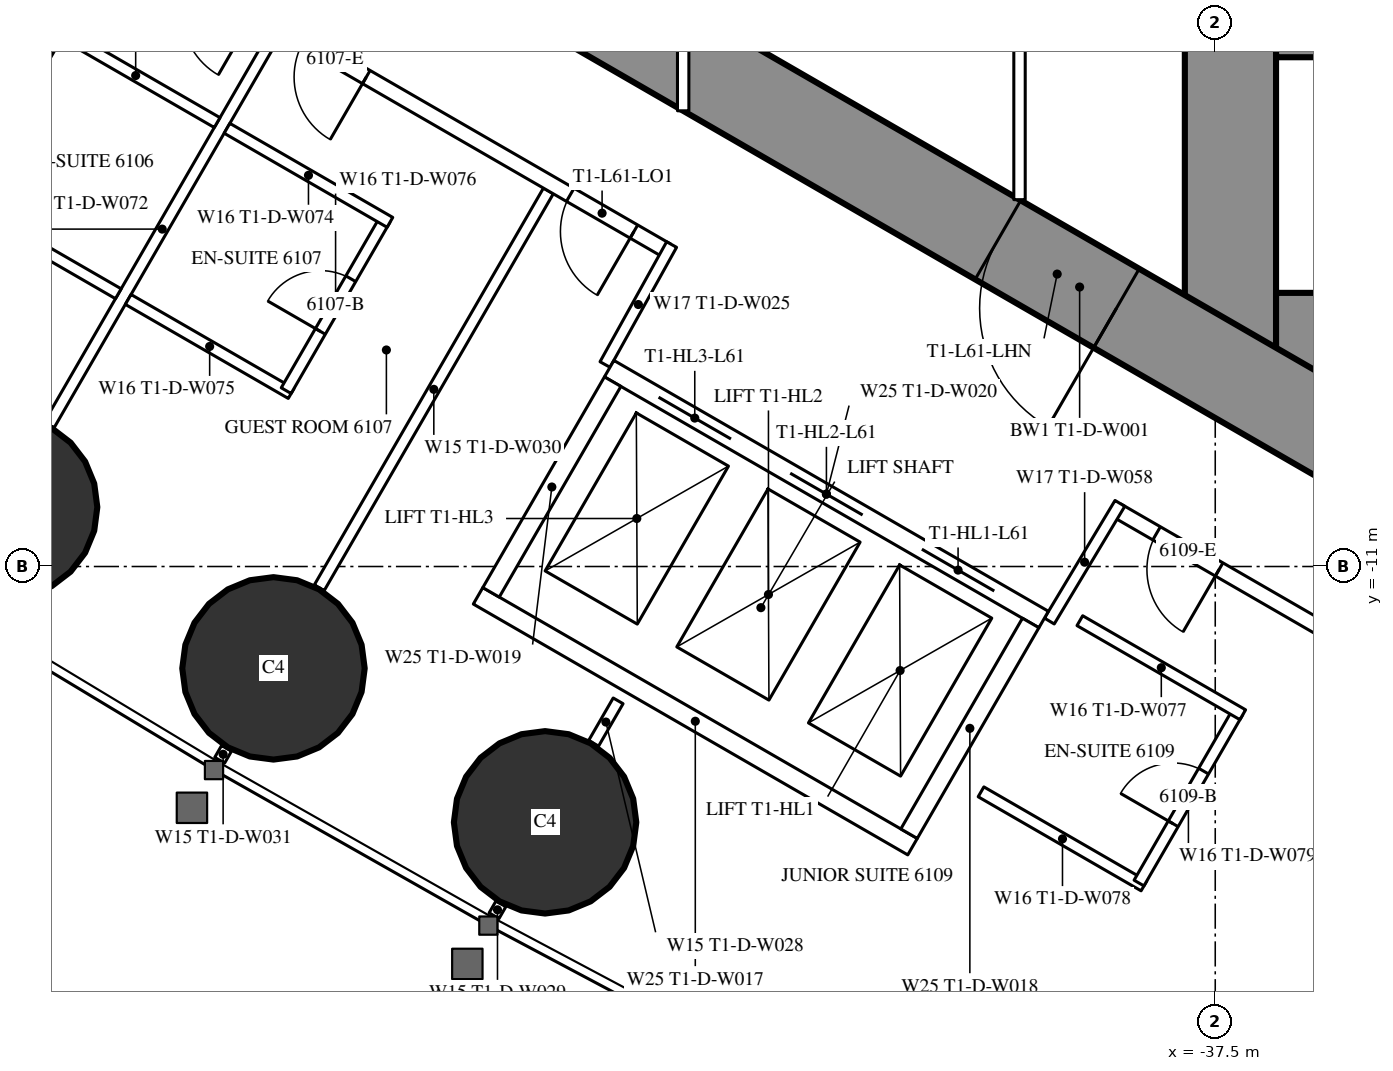
"""IFC4 building model, lengths in metres.
Left out: names, types, materials, properties, quantities, classifications, styles, units other than length and angle.
Written with IfcOpenShell. Run it as: python <this file> out.ifc"""

import sys

from ifc_helpers import new_model, si_unit, direction, frame, frame_2d, origin, origin_2d, place, context, subcontext, project, spatial, rectangle, circle, extrude, element, fill, save


model = new_model("IFC4")
c1 = context("Model", 3, precision=1e-05, world=origin(), true_north=direction((0.0, 1.0)))
c2 = subcontext(c1, "Body", "Model", "MODEL_VIEW")
j1 = project(units=[si_unit("LENGTHUNIT", "METRE"), si_unit("PLANEANGLEUNIT", "RADIAN")], contexts=[c1])
p1 = place(None, origin())
s1 = spatial("IfcSite", under=j1, at=p1, CompositionType="ELEMENT")
p2 = place(p1, origin())
s2 = spatial("IfcBuilding", under=s1, at=p2, CompositionType="ELEMENT")
p3 = place(p2, frame((0.0, 0.0, 229.7)))
s3 = spatial("IfcBuildingStorey", under=s2, at=p3, CompositionType="ELEMENT", Elevation=229.7)
for number, where, z_axis, x_axis in (
    (1, (-53.408, -10.219, 0.0), (0.0, 0.0, 1.0), (1.0, 0.0, 0.0)),
    (2, (-49.89, -12.34, 0.0), (0.0, 0.0, 1.0), (1.0, 0.0, 0.0)),
    (3, (-46.317, -14.365, 0.0), (0.0, 0.0, 1.0), (1.0, 0.0, 0.0)),
):
    element("IfcColumn", number, at=place(p3, frame(where, z_axis=z_axis, x_axis=x_axis)), inside=s3, PredefinedType="COLUMN", context=c2, shape_type="SweptSolid", body=[
        extrude(circle(Radius=1.2, at=origin_2d()), origin(), (0.0, 0.0, 1.0), 3.6),
    ])
p4 = place(p3, frame((-37.3, 8.6, 0.0), z_axis=(0.0, 0.0, 1.0), x_axis=(0.0, -1.0, 0.0)))
e4 = element("IfcWall", 4, at=p4, inside=s3, PredefinedType="SHEAR", context=c2, shape_type="SweptSolid", body=[
    extrude(rectangle(XDim=17.2, YDim=1.2, at=frame_2d((8.6, 0.0))), origin(), (0.0, 0.0, 1.0), 3.6),
])
p5 = place(p4, frame((7.7, 0.0, 0.0)))
e5 = element("IfcOpeningElement", 5, at=p5, cuts=e4, PredefinedType="OPENING", context=c2, shape_type="SweptSolid", body=[
    extrude(rectangle(XDim=1.8, YDim=2.2, at=frame_2d((0.9, 1.1))), frame((0.0, 0.61, 0.0), z_axis=(0.0, -1.0, 0.0), x_axis=(1.0, 0.0, 0.0)), (0.0, 0.0, 1.0), 1.22),
])
p6 = place(p3, frame((-28.3, -8.0, 0.0), z_axis=(0.0, 0.0, 1.0), x_axis=(-1.0, 0.0, 0.0)))
e6 = element("IfcWall", 6, at=p6, inside=s3, PredefinedType="SHEAR", context=c2, shape_type="SweptSolid", body=[
    extrude(rectangle(XDim=8.4, YDim=1.2, at=frame_2d((4.2, 0.0))), origin(), (0.0, 0.0, 1.0), 3.6),
])
p7 = place(p6, frame((0.25, 0.0, 0.0)))
e7 = element("IfcOpeningElement", 7, at=p7, cuts=e6, PredefinedType="OPENING", context=c2, shape_type="SweptSolid", body=[
    extrude(rectangle(XDim=1.0, YDim=2.2, at=frame_2d((0.5, 1.1))), frame((0.0, 0.61, 0.0), z_axis=(0.0, -1.0, 0.0), x_axis=(1.0, 0.0, 0.0)), (0.0, 0.0, 1.0), 1.22),
])
p8 = place(p3, frame((-28.3, -4.15, 0.0), z_axis=(0.0, 0.0, 1.0), x_axis=(-1.0, 0.0, 0.0)))
e8 = element("IfcWall", 8, at=p8, inside=s3, PredefinedType="SHEAR", context=c2, shape_type="SweptSolid", body=[
    extrude(rectangle(XDim=8.4, YDim=0.3, at=frame_2d((4.2, 0.0))), origin(), (0.0, 0.0, 1.0), 3.6),
])
p9 = place(p3, frame((-27.2, -14.3, 0.0), z_axis=(0.0, 0.0, 1.0), x_axis=(-0.866024021859, 0.500002393557, 0.0)))
e9 = element("IfcWall", 9, at=p9, inside=s3, PredefinedType="SHEAR", context=c2, shape_type="SweptSolid", body=[
    extrude(rectangle(XDim=27.907, YDim=1.2, at=frame_2d((13.954, 0.0))), origin(), (0.0, 0.0, 1.0), 3.6),
])
p10 = place(p9, frame((4.6, 0.0, 0.0)))
e10 = element("IfcOpeningElement", 10, at=p10, cuts=e9, PredefinedType="OPENING", context=c2, shape_type="SweptSolid", body=[
    extrude(rectangle(XDim=1.0, YDim=2.2, at=frame_2d((0.5, 1.1))), frame((0.0, 0.61, 0.0), z_axis=(0.0, -1.0, 0.0), x_axis=(1.0, 0.0, 0.0)), (0.0, 0.0, 1.0), 1.22),
])
p11 = place(p9, frame((13.395, 0.0, 0.0)))
e11 = element("IfcOpeningElement", 11, at=p11, cuts=e9, PredefinedType="OPENING", context=c2, shape_type="SweptSolid", body=[
    extrude(rectangle(XDim=1.8, YDim=2.2, at=frame_2d((0.9, 1.1))), frame((0.0, 0.61, 0.0), z_axis=(0.0, -1.0, 0.0), x_axis=(1.0, 0.0, 0.0)), (0.0, 0.0, 1.0), 1.22),
])
p12 = place(p3, frame((-46.898, -15.439, 0.0), z_axis=(0.0, 0.0, 1.0), x_axis=(-0.500232303069, -0.865891241997, 0.0)))
e12 = element("IfcWall", 12, at=p12, inside=s3, PredefinedType="PARTITIONING", context=c2, shape_type="SweptSolid", body=[
    extrude(rectangle(XDim=0.18, YDim=0.15, at=frame_2d((0.09, 0.0))), origin(), (0.0, 0.0, 1.0), 2.45),
])
p13 = place(p3, frame((-46.274, -6.059, 0.0), z_axis=(0.0, 0.0, 1.0), x_axis=(-0.500020471368, -0.866013584312, 0.0)))
e13 = element("IfcWall", 13, at=p13, inside=s3, PredefinedType="PARTITIONING", context=c2, shape_type="SweptSolid", body=[
    extrude(rectangle(XDim=6.028, YDim=0.15, at=frame_2d((3.014, 0.0))), origin(), (0.0, 0.0, 1.0), 2.45),
])
p14 = place(p3, frame((-50.508, -13.392, 0.0), z_axis=(0.0, 0.0, 1.0), x_axis=(-0.499644091975, -0.866230789891, 0.0)))
e14 = element("IfcWall", 14, at=p14, inside=s3, PredefinedType="PARTITIONING", context=c2, shape_type="SweptSolid", body=[
    extrude(rectangle(XDim=0.18, YDim=0.15, at=frame_2d((0.09, 0.0))), origin(), (0.0, 0.0, 1.0), 2.45),
])
p15 = place(p3, frame((-49.866, -3.985, 0.0), z_axis=(0.0, 0.0, 1.0), x_axis=(-0.500000694566, -0.866025002776, 0.0)))
e15 = element("IfcWall", 15, at=p15, inside=s3, PredefinedType="PARTITIONING", context=c2, shape_type="SweptSolid", body=[
    extrude(rectangle(XDim=5.95, YDim=0.15, at=frame_2d((2.975, 0.0))), origin(), (0.0, 0.0, 1.0), 2.45),
])
p16 = place(p3, frame((-45.356, -12.767, 0.0), z_axis=(0.0, 0.0, 1.0), x_axis=(-0.499886366516, -0.866091000168, 0.0)))
e16 = element("IfcWall", 16, at=p16, inside=s3, PredefinedType="PARTITIONING", context=c2, shape_type="SweptSolid", body=[
    extrude(rectangle(XDim=0.645, YDim=0.15, at=frame_2d((0.322, 0.0))), origin(), (0.0, 0.0, 1.0), 3.35),
])
p17 = place(p3, frame((-28.737, -16.068, 0.0), z_axis=(0.0, 0.0, 1.0), x_axis=(-0.866029399323, 0.49999307946, 0.0)))
e17 = element("IfcWall", 17, at=p17, inside=s3, PredefinedType="PARTITIONING", context=c2, shape_type="SweptSolid", body=[
    extrude(rectangle(XDim=11.61, YDim=0.2, at=frame_2d((5.805, 0.0))), origin(), (0.0, 0.0, 1.0), 3.35),
])
p18 = place(p17, frame((1.08, 0.0, 0.0)))
e18 = element("IfcOpeningElement", 18, at=p18, cuts=e17, PredefinedType="OPENING", context=c2, shape_type="SweptSolid", body=[
    extrude(rectangle(XDim=1.8, YDim=2.04, at=frame_2d((0.9, 1.02))), frame((0.0, 0.11, 0.0), z_axis=(0.0, -1.0, 0.0), x_axis=(1.0, 0.0, 0.0)), (0.0, 0.0, 1.0), 0.22),
])
p19 = place(p17, frame((10.06, 0.0, 0.0)))
e19 = element("IfcOpeningElement", 19, at=p19, cuts=e17, PredefinedType="OPENING", context=c2, shape_type="SweptSolid", body=[
    extrude(rectangle(XDim=0.95, YDim=2.2, at=frame_2d((0.475, 1.1))), frame((0.0, 0.11, 0.0), z_axis=(0.0, -1.0, 0.0), x_axis=(1.0, 0.0, 0.0)), (0.0, 0.0, 1.0), 0.22),
])
p20 = place(p3, frame((-44.715, -6.844, 0.0), z_axis=(0.0, 0.0, 1.0), x_axis=(-0.866025261224, 0.500000246922, 0.0)))
e20 = element("IfcWall", 20, at=p20, inside=s3, PredefinedType="PARTITIONING", context=c2, shape_type="SweptSolid", body=[
    extrude(rectangle(XDim=13.567, YDim=0.2, at=frame_2d((6.783, 0.0))), origin(), (0.0, 0.0, 1.0), 3.35),
])
p21 = place(p20, frame((6.266, 0.0, 0.0)))
e21 = element("IfcOpeningElement", 21, at=p21, cuts=e20, PredefinedType="OPENING", context=c2, shape_type="SweptSolid", body=[
    extrude(rectangle(XDim=0.95, YDim=2.2, at=frame_2d((0.475, 1.1))), frame((0.0, 0.11, 0.0), z_axis=(0.0, -1.0, 0.0), x_axis=(1.0, 0.0, 0.0)), (0.0, 0.0, 1.0), 0.22),
])
p22 = place(p20, frame((4.565, 0.0, 0.0)))
e22 = element("IfcOpeningElement", 22, at=p22, cuts=e20, PredefinedType="OPENING", context=c2, shape_type="SweptSolid", body=[
    extrude(rectangle(XDim=0.95, YDim=2.2, at=frame_2d((0.475, 1.1))), frame((0.0, 0.11, 0.0), z_axis=(0.0, -1.0, 0.0), x_axis=(1.0, 0.0, 0.0)), (0.0, 0.0, 1.0), 0.22),
])
p23 = place(p20, frame((0.5, 0.0, 0.0)))
e23 = element("IfcOpeningElement", 23, at=p23, cuts=e20, PredefinedType="OPENING", context=c2, shape_type="SweptSolid", body=[
    extrude(rectangle(XDim=0.967, YDim=2.2, at=frame_2d((0.483, 1.1))), frame((0.0, 0.11, 0.0), z_axis=(0.0, -1.0, 0.0), x_axis=(1.0, 0.0, 0.0)), (0.0, 0.0, 1.0), 0.22),
])
for number, where, z_axis, x_axis in (
    (24, (-39.683, -11.718, 0.0), (0.0, 0.0, 1.0), (0.514, 0.858, 0.0)),
    (25, (-44.652, -6.764, 0.0), (0.0, 0.0, 1.0), (-0.485, -0.874, 0.0)),
):
    element("IfcWall", number, at=place(p3, frame(where, z_axis=z_axis, x_axis=x_axis)), inside=s3, PredefinedType="PARTITIONING", context=c2, shape_type="SweptSolid", body=[
        extrude(rectangle(XDim=1.805, YDim=0.15, at=frame_2d((0.903, 0.0))), origin(), (0.0, 0.0, 1.0), 3.35),
    ])
p24 = place(p3, frame((-51.931, -7.411, 0.0), z_axis=(0.0, 0.0, 1.0), x_axis=(-0.866006523861, 0.500032699561, 0.0)))
e26 = element("IfcWall", 26, at=p24, inside=s3, PredefinedType="PARTITIONING", context=c2, shape_type="SweptSolid", body=[
    extrude(rectangle(XDim=2.475, YDim=0.15, at=frame_2d((1.237, 0.0))), origin(), (0.0, 0.0, 1.0), 3.35),
])
p25 = place(p3, frame((-52.71, -3.96, 0.0), z_axis=(0.0, 0.0, 1.0), x_axis=(-0.500006934395, -0.866021400173, 0.0)))
e27 = element("IfcWall", 27, at=p25, inside=s3, PredefinedType="PARTITIONING", context=c2, shape_type="SweptSolid", body=[
    extrude(rectangle(XDim=2.6, YDim=0.15, at=frame_2d((1.3, 0.0))), origin(), (0.0, 0.0, 1.0), 3.35),
])
p26 = place(p25, frame((0.9, 0.0, 0.0)))
e28 = element("IfcOpeningElement", 28, at=p26, cuts=e27, PredefinedType="OPENING", context=c2, shape_type="SweptSolid", body=[
    extrude(rectangle(XDim=0.8, YDim=2.2, at=frame_2d((0.4, 1.1))), frame((0.0, 0.085, 0.0), z_axis=(0.0, -1.0, 0.0), x_axis=(1.0, 0.0, 0.0)), (0.0, 0.0, 1.0), 0.17),
])
p27 = place(p3, frame((-50.631, -5.16, 0.0), z_axis=(0.0, 0.0, 1.0), x_axis=(-0.86604923931, 0.499958713387, 0.0)))
e29 = element("IfcWall", 29, at=p27, inside=s3, PredefinedType="PARTITIONING", context=c2, shape_type="SweptSolid", body=[
    extrude(rectangle(XDim=2.475, YDim=0.15, at=frame_2d((1.237, 0.0))), origin(), (0.0, 0.0, 1.0), 2.5),
])
p28 = place(p3, frame((-49.658, -8.724, 0.0), z_axis=(0.0, 0.0, 1.0), x_axis=(-0.866031185235, 0.4999899861, 0.0)))
e30 = element("IfcWall", 30, at=p28, inside=s3, PredefinedType="PARTITIONING", context=c2, shape_type="SweptSolid", body=[
    extrude(rectangle(XDim=2.475, YDim=0.15, at=frame_2d((1.238, 0.0))), origin(), (0.0, 0.0, 1.0), 3.35),
])
p29 = place(p3, frame((-48.423, -6.435, 0.0), z_axis=(0.0, 0.0, 1.0), x_axis=(-0.500006934395, -0.866021400173, 0.0)))
e31 = element("IfcWall", 31, at=p29, inside=s3, PredefinedType="PARTITIONING", context=c2, shape_type="SweptSolid", body=[
    extrude(rectangle(XDim=2.6, YDim=0.15, at=frame_2d((1.3, 0.0))), origin(), (0.0, 0.0, 1.0), 3.35),
])
p30 = place(p29, frame((0.9, 0.0, 0.0)))
e32 = element("IfcOpeningElement", 32, at=p30, cuts=e31, PredefinedType="OPENING", context=c2, shape_type="SweptSolid", body=[
    extrude(rectangle(XDim=0.8, YDim=2.2, at=frame_2d((0.4, 1.1))), frame((0.0, 0.085, 0.0), z_axis=(0.0, -1.0, 0.0), x_axis=(1.0, 0.0, 0.0)), (0.0, 0.0, 1.0), 0.17),
])
p31 = place(p3, frame((-48.358, -6.472, 0.0), z_axis=(0.0, 0.0, 1.0), x_axis=(-0.866073894602, 0.499916002032, 0.0)))
e33 = element("IfcWall", 33, at=p31, inside=s3, PredefinedType="PARTITIONING", context=c2, shape_type="SweptSolid", body=[
    extrude(rectangle(XDim=2.475, YDim=0.15, at=frame_2d((1.238, 0.0))), origin(), (0.0, 0.0, 1.0), 2.5),
])
p32 = place(p3, frame((-38.438, -15.202, 0.0), z_axis=(0.0, 0.0, 1.0), x_axis=(-0.866073894602, 0.499916002032, 0.0)))
e34 = element("IfcWall", 34, at=p32, inside=s3, PredefinedType="PARTITIONING", context=c2, shape_type="SweptSolid", body=[
    extrude(rectangle(XDim=2.475, YDim=0.15, at=frame_2d((1.238, 0.0))), origin(), (0.0, 0.0, 1.0), 3.35),
])
p33 = place(p3, frame((-37.203, -12.913, 0.0), z_axis=(0.0, 0.0, 1.0), x_axis=(-0.500006934395, -0.866021400173, 0.0)))
e35 = element("IfcWall", 35, at=p33, inside=s3, PredefinedType="PARTITIONING", context=c2, shape_type="SweptSolid", body=[
    extrude(rectangle(XDim=2.6, YDim=0.15, at=frame_2d((1.3, 0.0))), origin(), (0.0, 0.0, 1.0), 3.35),
])
p34 = place(p33, frame((0.9, 0.0, 0.0)))
e36 = element("IfcOpeningElement", 36, at=p34, cuts=e35, PredefinedType="OPENING", context=c2, shape_type="SweptSolid", body=[
    extrude(rectangle(XDim=0.8, YDim=2.2, at=frame_2d((0.4, 1.1))), frame((0.0, 0.085, 0.0), z_axis=(0.0, -1.0, 0.0), x_axis=(1.0, 0.0, 0.0)), (0.0, 0.0, 1.0), 0.17),
])
p35 = place(p3, frame((-37.138, -12.95, 0.0), z_axis=(0.0, 0.0, 1.0), x_axis=(-0.866031185235, 0.4999899861, 0.0)))
e37 = element("IfcWall", 37, at=p35, inside=s3, PredefinedType="PARTITIONING", context=c2, shape_type="SweptSolid", body=[
    extrude(rectangle(XDim=2.475, YDim=0.15, at=frame_2d((1.238, 0.0))), origin(), (0.0, 0.0, 1.0), 2.5),
])
p36 = place(p3, frame((-40.075, 6.174, 0.0), z_axis=(0.0, 0.0, 1.0), x_axis=(0.0, -1.0, 0.0)))
e38 = element("IfcWall", 38, at=p36, inside=s3, PredefinedType="PARTITIONING", context=c2, shape_type="SweptSolid", body=[
    extrude(rectangle(XDim=12.348, YDim=0.15, at=frame_2d((6.174, 0.0))), origin(), (0.0, 0.0, 1.0), 3.35),
])
p37 = place(p36, frame((5.274, 0.0, 0.0)))
e39 = element("IfcOpeningElement", 39, at=p37, cuts=e38, PredefinedType="OPENING", context=c2, shape_type="SweptSolid", body=[
    extrude(rectangle(XDim=1.8, YDim=2.2, at=frame_2d((0.9, 1.1))), frame((0.0, 0.085, 0.0), z_axis=(0.0, -1.0, 0.0), x_axis=(1.0, 0.0, 0.0)), (0.0, 0.0, 1.0), 0.17),
])
p38 = place(p3, frame((-44.5, 5.005, 0.0), z_axis=(0.0, 0.0, 1.0), x_axis=(0.0, -1.0, 0.0)))
e40 = element("IfcWall", 40, at=p38, inside=s3, PredefinedType="PARTITIONING", context=c2, shape_type="SweptSolid", body=[
    extrude(rectangle(XDim=10.009, YDim=0.15, at=frame_2d((5.005, 0.0))), origin(), (0.0, 0.0, 1.0), 2.5),
])
p39 = place(p38, frame((4.505, 0.0, 0.0)))
e41 = element("IfcOpeningElement", 41, at=p39, cuts=e40, PredefinedType="OPENING", context=c2, shape_type="SweptSolid", body=[
    extrude(rectangle(XDim=1.0, YDim=2.2, at=frame_2d((0.5, 1.1))), frame((0.0, 0.085, 0.0), z_axis=(0.0, -1.0, 0.0), x_axis=(1.0, 0.0, 0.0)), (0.0, 0.0, 1.0), 0.17),
])
p40 = place(p3, frame((-39.758, -11.697, 0.0), z_axis=(0.0, 0.0, 1.0), x_axis=(-0.866024194504, 0.500002094529, 0.0)))
e42 = element("IfcWall", 42, at=p40, inside=s3, PredefinedType="PARTITIONING", context=c2, shape_type="SweptSolid", body=[
    extrude(rectangle(XDim=6.6, YDim=0.25, at=frame_2d((3.3, 0.0))), origin(), (0.0, 0.0, 1.0), 3.35),
])
p41 = place(p40, frame((0.75, 0.0, 0.0)))
e43 = element("IfcOpeningElement", 43, at=p41, cuts=e42, PredefinedType="OPENING", context=c2, shape_type="SweptSolid", body=[
    extrude(rectangle(XDim=1.1, YDim=2.2, at=frame_2d((0.55, 1.1))), frame((0.0, 0.135, 0.0), z_axis=(0.0, -1.0, 0.0), x_axis=(1.0, 0.0, 0.0)), (0.0, 0.0, 1.0), 0.27),
])
p42 = place(p40, frame((2.75, 0.0, 0.0)))
e44 = element("IfcOpeningElement", 44, at=p42, cuts=e42, PredefinedType="OPENING", context=c2, shape_type="SweptSolid", body=[
    extrude(rectangle(XDim=1.1, YDim=2.2, at=frame_2d((0.55, 1.1))), frame((0.0, 0.135, 0.0), z_axis=(0.0, -1.0, 0.0), x_axis=(1.0, 0.0, 0.0)), (0.0, 0.0, 1.0), 0.27),
])
p43 = place(p40, frame((4.75, 0.0, 0.0)))
e45 = element("IfcOpeningElement", 45, at=p43, cuts=e42, PredefinedType="OPENING", context=c2, shape_type="SweptSolid", body=[
    extrude(rectangle(XDim=1.1, YDim=2.2, at=frame_2d((0.55, 1.1))), frame((0.0, 0.135, 0.0), z_axis=(0.0, -1.0, 0.0), x_axis=(1.0, 0.0, 0.0)), (0.0, 0.0, 1.0), 0.27),
])
p44 = place(p3, frame((-41.482, -14.686, 0.0), z_axis=(0.0, 0.0, 1.0), x_axis=(-0.86603344179, 0.499986077507, 0.0)))
e46 = element("IfcWall", 46, at=p44, inside=s3, PredefinedType="PARTITIONING", context=c2, shape_type="SweptSolid", body=[
    extrude(rectangle(XDim=6.6, YDim=0.25, at=frame_2d((3.3, 0.0))), origin(), (0.0, 0.0, 1.0), 3.35),
])
for number, where, z_axis, x_axis in (
    (47, (-39.928, -11.743, 0.0), (0.0, 0.0, 1.0), (-0.5, -0.866, 0.0)),
    (48, (-45.428, -8.568, 0.0), (0.0, 0.0, 1.0), (-0.5, -0.866, 0.0)),
):
    element("IfcWall", number, at=place(p3, frame(where, z_axis=z_axis, x_axis=x_axis)), inside=s3, PredefinedType="PARTITIONING", context=c2, shape_type="SweptSolid", body=[
        extrude(rectangle(XDim=3.201, YDim=0.25, at=frame_2d((1.6, 0.0))), origin(), (0.0, 0.0, 1.0), 3.35),
    ])
p45 = place(p30, origin())
e49 = element("IfcDoor", 49, at=p45, inside=s3, OperationType="SINGLE_SWING_RIGHT", PredefinedType="DOOR", context=c2, shape_type="SweptSolid", body=[
    extrude(rectangle(XDim=0.8, YDim=2.2, at=frame_2d((0.4, 1.1))), frame((0.0, 0.025, 0.0), z_axis=(0.0, -1.0, 0.0), x_axis=(1.0, 0.0, 0.0)), (0.0, 0.0, 1.0), 0.05),
])
fill(e32, e49)
p46 = place(p22, origin())
e50 = element("IfcDoor", 50, at=p46, inside=s3, OperationType="SINGLE_SWING_LEFT", PredefinedType="DOOR", context=c2, shape_type="SweptSolid", body=[
    extrude(rectangle(XDim=0.95, YDim=2.2, at=frame_2d((0.475, 1.1))), frame((0.0, 0.025, 0.0), z_axis=(0.0, -1.0, 0.0), x_axis=(1.0, 0.0, 0.0)), (0.0, 0.0, 1.0), 0.05),
])
fill(e22, e50)
p47 = place(p34, origin())
e51 = element("IfcDoor", 51, at=p47, inside=s3, OperationType="SINGLE_SWING_RIGHT", PredefinedType="DOOR", context=c2, shape_type="SweptSolid", body=[
    extrude(rectangle(XDim=0.8, YDim=2.2, at=frame_2d((0.4, 1.1))), frame((0.0, 0.025, 0.0), z_axis=(0.0, -1.0, 0.0), x_axis=(1.0, 0.0, 0.0)), (0.0, 0.0, 1.0), 0.05),
])
fill(e36, e51)
p48 = place(p19, origin())
e52 = element("IfcDoor", 52, at=p48, inside=s3, OperationType="SINGLE_SWING_LEFT", PredefinedType="DOOR", context=c2, shape_type="SweptSolid", body=[
    extrude(rectangle(XDim=0.95, YDim=2.2, at=frame_2d((0.475, 1.1))), frame((0.0, 0.025, 0.0), z_axis=(0.0, -1.0, 0.0), x_axis=(1.0, 0.0, 0.0)), (0.0, 0.0, 1.0), 0.05),
])
fill(e19, e52)
p49 = place(p23, origin())
e53 = element("IfcDoor", 53, at=p49, inside=s3, OperationType="SINGLE_SWING_LEFT", PredefinedType="DOOR", context=c2, shape_type="SweptSolid", body=[
    extrude(rectangle(XDim=0.967, YDim=2.2, at=frame_2d((0.483, 1.1))), frame((0.0, 0.025, 0.0), z_axis=(0.0, -1.0, 0.0), x_axis=(1.0, 0.0, 0.0)), (0.0, 0.0, 1.0), 0.05),
])
fill(e23, e53)
p50 = place(p11, origin())
e54 = element("IfcDoor", 54, at=p50, inside=s3, OperationType="DOUBLE_DOOR_SINGLE_SWING", PredefinedType="DOOR", context=c2, shape_type="SweptSolid", body=[
    extrude(rectangle(XDim=1.8, YDim=2.2, at=frame_2d((0.9, 1.1))), frame((0.0, 0.025, 0.0), z_axis=(0.0, -1.0, 0.0), x_axis=(1.0, 0.0, 0.0)), (0.0, 0.0, 1.0), 0.05),
])
fill(e11, e54)
p51 = place(p41, origin())
e55 = element("IfcDoor", 55, at=p51, inside=s3, OperationType="DOUBLE_DOOR_SLIDING", PredefinedType="USERDEFINED", context=c2, shape_type="SweptSolid", body=[
    extrude(rectangle(XDim=1.1, YDim=2.2, at=frame_2d((0.55, 1.1))), frame((0.0, 0.025, 0.0), z_axis=(0.0, -1.0, 0.0), x_axis=(1.0, 0.0, 0.0)), (0.0, 0.0, 1.0), 0.05),
])
fill(e43, e55)
p52 = place(p42, origin())
e56 = element("IfcDoor", 56, at=p52, inside=s3, OperationType="DOUBLE_DOOR_SLIDING", PredefinedType="USERDEFINED", context=c2, shape_type="SweptSolid", body=[
    extrude(rectangle(XDim=1.1, YDim=2.2, at=frame_2d((0.55, 1.1))), frame((0.0, 0.025, 0.0), z_axis=(0.0, -1.0, 0.0), x_axis=(1.0, 0.0, 0.0)), (0.0, 0.0, 1.0), 0.05),
])
fill(e44, e56)
p53 = place(p43, origin())
e57 = element("IfcDoor", 57, at=p53, inside=s3, OperationType="DOUBLE_DOOR_SLIDING", PredefinedType="USERDEFINED", context=c2, shape_type="SweptSolid", body=[
    extrude(rectangle(XDim=1.1, YDim=2.2, at=frame_2d((0.55, 1.1))), frame((0.0, 0.025, 0.0), z_axis=(0.0, -1.0, 0.0), x_axis=(1.0, 0.0, 0.0)), (0.0, 0.0, 1.0), 0.05),
])
fill(e45, e57)
save(model, sys.argv[1])
